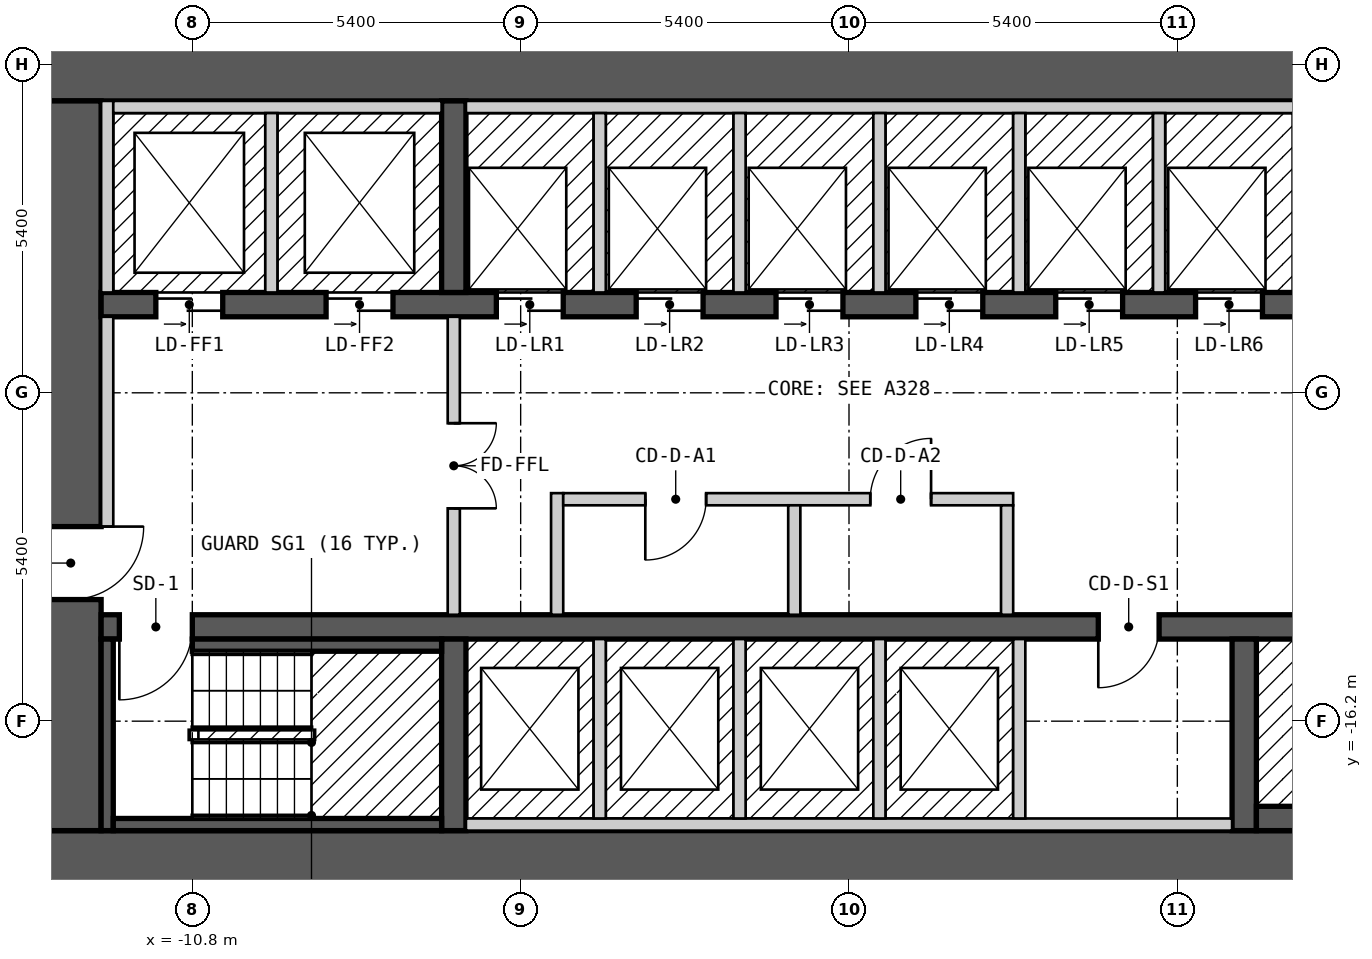
"""IFC4 building model, lengths in metres.
Left out: names, types, materials, properties, quantities, classifications, styles, units other than length and angle.
Written with IfcOpenShell. Run it as: python <this file> out.ifc"""

import sys

from ifc_helpers import new_model, si_unit, direction, frame, frame_2d, origin, place, context, subcontext, project, spatial, rectangle, extrude, element, fill, save


model = new_model("IFC4")
c1 = context("Model", 3, precision=1e-05, world=origin(), true_north=direction((0.0, 1.0)))
c2 = subcontext(c1, "Body", "Model", "MODEL_VIEW")
j1 = project(units=[si_unit("LENGTHUNIT", "METRE"), si_unit("PLANEANGLEUNIT", "RADIAN")], contexts=[c1])
p1 = place(None, origin())
s1 = spatial("IfcSite", under=j1, at=p1, CompositionType="ELEMENT")
p2 = place(p1, origin())
s2 = spatial("IfcBuilding", under=s1, at=p2, CompositionType="ELEMENT")
p3 = place(p2, frame((0.0, 0.0, 99.0)))
s3 = spatial("IfcBuildingStorey", under=s2, at=p3, CompositionType="ELEMENT", Elevation=99.0)
p4 = place(p3, frame((-13.3, -18.5, 0.0), z_axis=(0.0, 0.0, 1.0), x_axis=(1.0, 0.0, 0.0)))
e1 = element("IfcWall", 1, at=p4, inside=s3, PredefinedType="SHEAR", context=c2, shape_type="SweptSolid", body=[
    extrude(rectangle(XDim=26.6, YDim=1.0, at=frame_2d((13.3, 0.0))), origin(), (0.0, 0.0, 1.0), 2.7),
])
p5 = place(p3, frame((-13.3, -5.5, 0.0), z_axis=(0.0, 0.0, 1.0), x_axis=(1.0, 0.0, 0.0)))
e2 = element("IfcWall", 2, at=p5, inside=s3, PredefinedType="SHEAR", context=c2, shape_type="SweptSolid", body=[
    extrude(rectangle(XDim=26.6, YDim=1.0, at=frame_2d((13.3, 0.0))), origin(), (0.0, 0.0, 1.0), 2.7),
])
p6 = place(p5, frame((23.65, 0.0, 0.0)))
e3 = element("IfcOpeningElement", 3, at=p6, cuts=e2, PredefinedType="OPENING", context=c2, shape_type="SweptSolid", body=[
    extrude(rectangle(XDim=1.2, YDim=2.1, at=frame_2d((0.6, 1.05))), frame((0.0, 0.51, 0.0), z_axis=(0.0, -1.0, 0.0), x_axis=(1.0, 0.0, 0.0)), (0.0, 0.0, 1.0), 1.02),
])
p7 = place(p3, frame((-12.8, -18.0, 0.0), z_axis=(0.0, 0.0, 1.0), x_axis=(0.0, 1.0, 0.0)))
e4 = element("IfcWall", 4, at=p7, inside=s3, PredefinedType="SHEAR", context=c2, shape_type="SweptSolid", body=[
    extrude(rectangle(XDim=12.0, YDim=1.0, at=frame_2d((6.0, 0.0))), origin(), (0.0, 0.0, 1.0), 2.7),
])
p8 = place(p7, frame((3.8, 0.0, 0.0)))
e5 = element("IfcOpeningElement", 5, at=p8, cuts=e4, PredefinedType="OPENING", context=c2, shape_type="SweptSolid", body=[
    extrude(rectangle(XDim=1.2, YDim=2.1, at=frame_2d((0.6, 1.05))), frame((0.0, 0.51, 0.0), z_axis=(0.0, -1.0, 0.0), x_axis=(1.0, 0.0, 0.0)), (0.0, 0.0, 1.0), 1.02),
])
p9 = place(p3, frame((-12.3, -14.65, 0.0), z_axis=(0.0, 0.0, 1.0), x_axis=(1.0, 0.0, 0.0)))
e6 = element("IfcWall", 6, at=p9, inside=s3, PredefinedType="SHEAR", context=c2, shape_type="SweptSolid", body=[
    extrude(rectangle(XDim=24.6, YDim=0.4, at=frame_2d((12.3, 0.0))), origin(), (0.0, 0.0, 1.0), 2.7),
])
p10 = place(p9, frame((1.5, 0.0, 0.0), z_axis=(0.0, 0.0, 1.0), x_axis=(-1.0, 0.0, 0.0)))
e7 = element("IfcOpeningElement", 7, at=p10, cuts=e6, PredefinedType="OPENING", context=c2, shape_type="SweptSolid", body=[
    extrude(rectangle(XDim=1.2, YDim=2.1, at=frame_2d((0.6, 1.05))), frame((0.0, 0.21, 0.0), z_axis=(0.0, -1.0, 0.0), x_axis=(1.0, 0.0, 0.0)), (0.0, 0.0, 1.0), 0.42),
])
p11 = place(p9, frame((24.35, 0.0, 0.0), z_axis=(0.0, 0.0, 1.0), x_axis=(-1.0, 0.0, 0.0)))
e8 = element("IfcOpeningElement", 8, at=p11, cuts=e6, PredefinedType="OPENING", context=c2, shape_type="SweptSolid", body=[
    extrude(rectangle(XDim=1.2, YDim=2.1, at=frame_2d((0.6, 1.05))), frame((0.0, 0.21, 0.0), z_axis=(0.0, -1.0, 0.0), x_axis=(1.0, 0.0, 0.0)), (0.0, 0.0, 1.0), 0.42),
])
p12 = place(p9, frame((17.4, 0.0, 0.0), z_axis=(0.0, 0.0, 1.0), x_axis=(-1.0, 0.0, 0.0)))
e9 = element("IfcOpeningElement", 9, at=p12, cuts=e6, PredefinedType="OPENING", context=c2, shape_type="SweptSolid", body=[
    extrude(rectangle(XDim=1.0, YDim=2.1, at=frame_2d((0.5, 1.05))), frame((0.0, 0.21, 0.0), z_axis=(0.0, -1.0, 0.0), x_axis=(1.0, 0.0, 0.0)), (0.0, 0.0, 1.0), 0.42),
])
p13 = place(p3, frame((-12.3, -9.35, 0.0), z_axis=(0.0, 0.0, 1.0), x_axis=(1.0, 0.0, 0.0)))
e10 = element("IfcWall", 10, at=p13, inside=s3, PredefinedType="SHEAR", context=c2, shape_type="SweptSolid", body=[
    extrude(rectangle(XDim=22.5, YDim=0.4, at=frame_2d((11.25, 0.0))), origin(), (0.0, 0.0, 1.0), 2.7),
])
p14 = place(p13, frame((0.9, 0.0, 0.0)))
e11 = element("IfcOpeningElement", 11, at=p14, cuts=e10, PredefinedType="OPENING", context=c2, shape_type="SweptSolid", body=[
    extrude(rectangle(XDim=1.1, YDim=2.1, at=frame_2d((0.55, 1.05))), frame((0.0, 0.21, 0.0), z_axis=(0.0, -1.0, 0.0), x_axis=(1.0, 0.0, 0.0)), (0.0, 0.0, 1.0), 0.42),
])
p15 = place(p13, frame((3.7, 0.0, 0.0)))
e12 = element("IfcOpeningElement", 12, at=p15, cuts=e10, PredefinedType="OPENING", context=c2, shape_type="SweptSolid", body=[
    extrude(rectangle(XDim=1.1, YDim=2.1, at=frame_2d((0.55, 1.05))), frame((0.0, 0.21, 0.0), z_axis=(0.0, -1.0, 0.0), x_axis=(1.0, 0.0, 0.0)), (0.0, 0.0, 1.0), 0.42),
])
p16 = place(p13, frame((6.5, 0.0, 0.0)))
e13 = element("IfcOpeningElement", 13, at=p16, cuts=e10, PredefinedType="OPENING", context=c2, shape_type="SweptSolid", body=[
    extrude(rectangle(XDim=1.1, YDim=2.1, at=frame_2d((0.55, 1.05))), frame((0.0, 0.21, 0.0), z_axis=(0.0, -1.0, 0.0), x_axis=(1.0, 0.0, 0.0)), (0.0, 0.0, 1.0), 0.42),
])
p17 = place(p13, frame((8.8, 0.0, 0.0)))
e14 = element("IfcOpeningElement", 14, at=p17, cuts=e10, PredefinedType="OPENING", context=c2, shape_type="SweptSolid", body=[
    extrude(rectangle(XDim=1.1, YDim=2.1, at=frame_2d((0.55, 1.05))), frame((0.0, 0.21, 0.0), z_axis=(0.0, -1.0, 0.0), x_axis=(1.0, 0.0, 0.0)), (0.0, 0.0, 1.0), 0.42),
])
p18 = place(p13, frame((11.1, 0.0, 0.0)))
e15 = element("IfcOpeningElement", 15, at=p18, cuts=e10, PredefinedType="OPENING", context=c2, shape_type="SweptSolid", body=[
    extrude(rectangle(XDim=1.1, YDim=2.1, at=frame_2d((0.55, 1.05))), frame((0.0, 0.21, 0.0), z_axis=(0.0, -1.0, 0.0), x_axis=(1.0, 0.0, 0.0)), (0.0, 0.0, 1.0), 0.42),
])
p19 = place(p13, frame((13.4, 0.0, 0.0)))
e16 = element("IfcOpeningElement", 16, at=p19, cuts=e10, PredefinedType="OPENING", context=c2, shape_type="SweptSolid", body=[
    extrude(rectangle(XDim=1.1, YDim=2.1, at=frame_2d((0.55, 1.05))), frame((0.0, 0.21, 0.0), z_axis=(0.0, -1.0, 0.0), x_axis=(1.0, 0.0, 0.0)), (0.0, 0.0, 1.0), 0.42),
])
p20 = place(p13, frame((15.7, 0.0, 0.0)))
e17 = element("IfcOpeningElement", 17, at=p20, cuts=e10, PredefinedType="OPENING", context=c2, shape_type="SweptSolid", body=[
    extrude(rectangle(XDim=1.1, YDim=2.1, at=frame_2d((0.55, 1.05))), frame((0.0, 0.21, 0.0), z_axis=(0.0, -1.0, 0.0), x_axis=(1.0, 0.0, 0.0)), (0.0, 0.0, 1.0), 0.42),
])
p21 = place(p13, frame((18.0, 0.0, 0.0)))
e18 = element("IfcOpeningElement", 18, at=p21, cuts=e10, PredefinedType="OPENING", context=c2, shape_type="SweptSolid", body=[
    extrude(rectangle(XDim=1.1, YDim=2.1, at=frame_2d((0.55, 1.05))), frame((0.0, 0.21, 0.0), z_axis=(0.0, -1.0, 0.0), x_axis=(1.0, 0.0, 0.0)), (0.0, 0.0, 1.0), 0.42),
])
p22 = place(p13, frame((20.4, 0.0, 0.0)))
e19 = element("IfcOpeningElement", 19, at=p22, cuts=e10, PredefinedType="OPENING", context=c2, shape_type="SweptSolid", body=[
    extrude(rectangle(XDim=1.1, YDim=2.1, at=frame_2d((0.55, 1.05))), frame((0.0, 0.21, 0.0), z_axis=(0.0, -1.0, 0.0), x_axis=(1.0, 0.0, 0.0)), (0.0, 0.0, 1.0), 0.42),
])
for number, where, z_axis, x_axis in (
    (20, (-6.5, -18.0, 0.0), (0.0, 0.0, 1.0), (0.0, 1.0, 0.0)),
    (21, (6.5, -18.0, 0.0), (0.0, 0.0, 1.0), (0.0, 1.0, 0.0)),
    (22, (-6.5, -9.15, 0.0), (0.0, 0.0, 1.0), (0.0, 1.0, 0.0)),
):
    element("IfcWall", number, at=place(p3, frame(where, z_axis=z_axis, x_axis=x_axis)), inside=s3, PredefinedType="SHEAR", context=c2, shape_type="SweptSolid", body=[
        extrude(rectangle(XDim=3.15, YDim=0.4, at=frame_2d((1.575, 0.0))), origin(), (0.0, 0.0, 1.0), 2.7),
    ])
p23 = place(p3, frame((-12.2, -18.0, 0.0), z_axis=(0.0, 0.0, 1.0), x_axis=(0.0, 1.0, 0.0)))
e23 = element("IfcWall", 23, at=p23, inside=s3, PredefinedType="SOLIDWALL", context=c2, shape_type="SweptSolid", body=[
    extrude(rectangle(XDim=3.15, YDim=0.2, at=frame_2d((1.575, 0.0))), origin(), (0.0, 0.0, 1.0), 2.7),
])
p24 = place(p3, frame((-12.2, -13.0, 0.0), z_axis=(0.0, 0.0, 1.0), x_axis=(0.0, 1.0, 0.0)))
e24 = element("IfcWall", 24, at=p24, inside=s3, PredefinedType="PARTITIONING", context=c2, shape_type="SweptSolid", body=[
    extrude(rectangle(XDim=3.45, YDim=0.2, at=frame_2d((1.725, 0.0))), origin(), (0.0, 0.0, 1.0), 2.7),
])
p25 = place(p3, frame((-12.2, -9.15, 0.0), z_axis=(0.0, 0.0, 1.0), x_axis=(0.0, 1.0, 0.0)))
e25 = element("IfcWall", 25, at=p25, inside=s3, PredefinedType="SOLIDWALL", context=c2, shape_type="SweptSolid", body=[
    extrude(rectangle(XDim=3.15, YDim=0.2, at=frame_2d((1.575, 0.0))), origin(), (0.0, 0.0, 1.0), 2.7),
])
for number, where, z_axis, x_axis in (
    (26, (-12.1, -17.9, 0.0), (0.0, 0.0, 1.0), (1.0, 0.0, 0.0)),
    (27, (-12.1, -6.1, 0.0), (0.0, 0.0, 1.0), (1.0, 0.0, 0.0)),
):
    element("IfcWall", number, at=place(p3, frame(where, z_axis=z_axis, x_axis=x_axis)), inside=s3, PredefinedType="SOLIDWALL", context=c2, shape_type="SweptSolid", body=[
        extrude(rectangle(XDim=5.4, YDim=0.2, at=frame_2d((2.7, 0.0))), origin(), (0.0, 0.0, 1.0), 2.7),
    ])
p26 = place(p3, frame((-10.8, -14.95, 0.0), z_axis=(0.0, 0.0, 1.0), x_axis=(1.0, 0.0, 0.0)))
e28 = element("IfcWall", 28, at=p26, inside=s3, PredefinedType="SOLIDWALL", context=c2, shape_type="SweptSolid", body=[
    extrude(rectangle(XDim=4.1, YDim=0.2, at=frame_2d((2.05, 0.0))), origin(), (0.0, 0.0, 1.0), 2.7),
])
p27 = place(p3, frame((-9.5, -9.15, 0.0), z_axis=(0.0, 0.0, 1.0), x_axis=(0.0, 1.0, 0.0)))
e29 = element("IfcWall", 29, at=p27, inside=s3, PredefinedType="SOLIDWALL", context=c2, shape_type="SweptSolid", body=[
    extrude(rectangle(XDim=2.95, YDim=0.2, at=frame_2d((1.475, 0.0))), origin(), (0.0, 0.0, 1.0), 2.7),
])
p28 = place(p3, frame((-6.5, -14.45, 0.0), z_axis=(0.0, 0.0, 1.0), x_axis=(0.0, 1.0, 0.0)))
e30 = element("IfcWall", 30, at=p28, inside=s3, PredefinedType="PARTITIONING", context=c2, shape_type="SweptSolid", body=[
    extrude(rectangle(XDim=4.9, YDim=0.2, at=frame_2d((2.45, 0.0))), origin(), (0.0, 0.0, 1.0), 2.7),
])
p29 = place(p28, frame((3.15, 0.0, 0.0), z_axis=(0.0, 0.0, 1.0), x_axis=(-1.0, 0.0, 0.0)))
e31 = element("IfcOpeningElement", 31, at=p29, cuts=e30, PredefinedType="OPENING", context=c2, shape_type="SweptSolid", body=[
    extrude(rectangle(XDim=1.4, YDim=2.1, at=frame_2d((0.7, 1.05))), frame((0.0, 0.11, 0.0), z_axis=(0.0, -1.0, 0.0), x_axis=(1.0, 0.0, 0.0)), (0.0, 0.0, 1.0), 0.22),
])
p30 = place(p3, frame((-6.3, -17.9, 0.0), z_axis=(0.0, 0.0, 1.0), x_axis=(1.0, 0.0, 0.0)))
e32 = element("IfcWall", 32, at=p30, inside=s3, PredefinedType="SOLIDWALL", context=c2, shape_type="SweptSolid", body=[
    extrude(rectangle(XDim=12.6, YDim=0.2, at=frame_2d((6.3, 0.0))), origin(), (0.0, 0.0, 1.0), 2.7),
])
p31 = place(p3, frame((-6.3, -6.1, 0.0), z_axis=(0.0, 0.0, 1.0), x_axis=(1.0, 0.0, 0.0)))
e33 = element("IfcWall", 33, at=p31, inside=s3, PredefinedType="SOLIDWALL", context=c2, shape_type="SweptSolid", body=[
    extrude(rectangle(XDim=16.1, YDim=0.2, at=frame_2d((8.05, 0.0))), origin(), (0.0, 0.0, 1.0), 2.7),
])
p32 = place(p3, frame((-4.8, -14.45, 0.0), z_axis=(0.0, 0.0, 1.0), x_axis=(0.0, 1.0, 0.0)))
e34 = element("IfcWall", 34, at=p32, inside=s3, PredefinedType="PARTITIONING", context=c2, shape_type="SweptSolid", body=[
    extrude(rectangle(XDim=2.0, YDim=0.2, at=frame_2d((1.0, 0.0))), origin(), (0.0, 0.0, 1.0), 2.7),
])
p33 = place(p3, frame((-4.7, -12.55, 0.0), z_axis=(0.0, 0.0, 1.0), x_axis=(1.0, 0.0, 0.0)))
e35 = element("IfcWall", 35, at=p33, inside=s3, PredefinedType="PARTITIONING", context=c2, shape_type="SweptSolid", body=[
    extrude(rectangle(XDim=7.4, YDim=0.2, at=frame_2d((3.7, 0.0))), origin(), (0.0, 0.0, 1.0), 2.7),
])
p34 = place(p33, frame((2.35, 0.0, 0.0), z_axis=(0.0, 0.0, 1.0), x_axis=(-1.0, 0.0, 0.0)))
e36 = element("IfcOpeningElement", 36, at=p34, cuts=e35, PredefinedType="OPENING", context=c2, shape_type="SweptSolid", body=[
    extrude(rectangle(XDim=1.0, YDim=2.1, at=frame_2d((0.5, 1.05))), frame((0.0, 0.11, 0.0), z_axis=(0.0, -1.0, 0.0), x_axis=(1.0, 0.0, 0.0)), (0.0, 0.0, 1.0), 0.22),
])
p35 = place(p33, frame((6.05, 0.0, 0.0), z_axis=(0.0, 0.0, 1.0), x_axis=(-1.0, 0.0, 0.0)))
e37 = element("IfcOpeningElement", 37, at=p35, cuts=e35, PredefinedType="OPENING", context=c2, shape_type="SweptSolid", body=[
    extrude(rectangle(XDim=1.0, YDim=2.1, at=frame_2d((0.5, 1.05))), frame((0.0, 0.11, 0.0), z_axis=(0.0, -1.0, 0.0), x_axis=(1.0, 0.0, 0.0)), (0.0, 0.0, 1.0), 0.22),
])
for number, where, z_axis, x_axis in (
    (38, (-4.1, -17.8, 0.0), (0.0, 0.0, 1.0), (0.0, 1.0, 0.0)),
    (39, (-4.1, -9.15, 0.0), (0.0, 0.0, 1.0), (0.0, 1.0, 0.0)),
    (40, (-1.8, -17.8, 0.0), (0.0, 0.0, 1.0), (0.0, 1.0, 0.0)),
    (41, (-1.8, -9.15, 0.0), (0.0, 0.0, 1.0), (0.0, 1.0, 0.0)),
):
    element("IfcWall", number, at=place(p3, frame(where, z_axis=z_axis, x_axis=x_axis)), inside=s3, PredefinedType="SOLIDWALL", context=c2, shape_type="SweptSolid", body=[
        extrude(rectangle(XDim=2.95, YDim=0.2, at=frame_2d((1.475, 0.0))), origin(), (0.0, 0.0, 1.0), 2.7),
    ])
p36 = place(p3, frame((-0.9, -14.45, 0.0), z_axis=(0.0, 0.0, 1.0), x_axis=(0.0, 1.0, 0.0)))
e42 = element("IfcWall", 42, at=p36, inside=s3, PredefinedType="PARTITIONING", context=c2, shape_type="SweptSolid", body=[
    extrude(rectangle(XDim=1.8, YDim=0.2, at=frame_2d((0.9, 0.0))), origin(), (0.0, 0.0, 1.0), 2.7),
])
for number, where, z_axis, x_axis in (
    (43, (0.5, -17.8, 0.0), (0.0, 0.0, 1.0), (0.0, 1.0, 0.0)),
    (44, (0.5, -9.15, 0.0), (0.0, 0.0, 1.0), (0.0, 1.0, 0.0)),
):
    element("IfcWall", number, at=place(p3, frame(where, z_axis=z_axis, x_axis=x_axis)), inside=s3, PredefinedType="SOLIDWALL", context=c2, shape_type="SweptSolid", body=[
        extrude(rectangle(XDim=2.95, YDim=0.2, at=frame_2d((1.475, 0.0))), origin(), (0.0, 0.0, 1.0), 2.7),
    ])
p37 = place(p3, frame((2.6, -14.45, 0.0), z_axis=(0.0, 0.0, 1.0), x_axis=(0.0, 1.0, 0.0)))
e45 = element("IfcWall", 45, at=p37, inside=s3, PredefinedType="PARTITIONING", context=c2, shape_type="SweptSolid", body=[
    extrude(rectangle(XDim=1.8, YDim=0.2, at=frame_2d((0.9, 0.0))), origin(), (0.0, 0.0, 1.0), 2.7),
])
for number, where, z_axis, x_axis in (
    (46, (2.8, -17.8, 0.0), (0.0, 0.0, 1.0), (0.0, 1.0, 0.0)),
    (47, (2.8, -9.15, 0.0), (0.0, 0.0, 1.0), (0.0, 1.0, 0.0)),
    (48, (5.1, -9.15, 0.0), (0.0, 0.0, 1.0), (0.0, 1.0, 0.0)),
):
    element("IfcWall", number, at=place(p3, frame(where, z_axis=z_axis, x_axis=x_axis)), inside=s3, PredefinedType="SOLIDWALL", context=c2, shape_type="SweptSolid", body=[
        extrude(rectangle(XDim=2.95, YDim=0.2, at=frame_2d((1.475, 0.0))), origin(), (0.0, 0.0, 1.0), 2.7),
    ])
p38 = place(p3, frame((6.7, -17.8, 0.0), z_axis=(0.0, 0.0, 1.0), x_axis=(1.0, 0.0, 0.0)))
e49 = element("IfcWall", 49, at=p38, inside=s3, PredefinedType="SOLIDWALL", context=c2, shape_type="SweptSolid", body=[
    extrude(rectangle(XDim=5.6, YDim=0.4, at=frame_2d((2.8, 0.0))), origin(), (0.0, 0.0, 1.0), 2.7),
])
p39 = place(p3, frame((7.4, -9.15, 0.0), z_axis=(0.0, 0.0, 1.0), x_axis=(0.0, 1.0, 0.0)))
e50 = element("IfcWall", 50, at=p39, inside=s3, PredefinedType="SOLIDWALL", context=c2, shape_type="SweptSolid", body=[
    extrude(rectangle(XDim=2.95, YDim=0.2, at=frame_2d((1.475, 0.0))), origin(), (0.0, 0.0, 1.0), 2.7),
])
p40 = place(p14, origin())
e51 = element("IfcDoor", 51, at=p40, inside=s3, OperationType="DOUBLE_DOOR_SLIDING", PredefinedType="DOOR", context=c2, shape_type="SweptSolid", body=[
    extrude(rectangle(XDim=1.1, YDim=2.1, at=frame_2d((0.55, 1.05))), frame((0.0, 0.025, 0.0), z_axis=(0.0, -1.0, 0.0), x_axis=(1.0, 0.0, 0.0)), (0.0, 0.0, 1.0), 0.05),
])
fill(e11, e51)
p41 = place(p15, origin())
e52 = element("IfcDoor", 52, at=p41, inside=s3, OperationType="DOUBLE_DOOR_SLIDING", PredefinedType="DOOR", context=c2, shape_type="SweptSolid", body=[
    extrude(rectangle(XDim=1.1, YDim=2.1, at=frame_2d((0.55, 1.05))), frame((0.0, 0.025, 0.0), z_axis=(0.0, -1.0, 0.0), x_axis=(1.0, 0.0, 0.0)), (0.0, 0.0, 1.0), 0.05),
])
fill(e12, e52)
p42 = place(p16, origin())
e53 = element("IfcDoor", 53, at=p42, inside=s3, OperationType="DOUBLE_DOOR_SLIDING", PredefinedType="DOOR", context=c2, shape_type="SweptSolid", body=[
    extrude(rectangle(XDim=1.1, YDim=2.1, at=frame_2d((0.55, 1.05))), frame((0.0, 0.025, 0.0), z_axis=(0.0, -1.0, 0.0), x_axis=(1.0, 0.0, 0.0)), (0.0, 0.0, 1.0), 0.05),
])
fill(e13, e53)
p43 = place(p17, origin())
e54 = element("IfcDoor", 54, at=p43, inside=s3, OperationType="DOUBLE_DOOR_SLIDING", PredefinedType="DOOR", context=c2, shape_type="SweptSolid", body=[
    extrude(rectangle(XDim=1.1, YDim=2.1, at=frame_2d((0.55, 1.05))), frame((0.0, 0.025, 0.0), z_axis=(0.0, -1.0, 0.0), x_axis=(1.0, 0.0, 0.0)), (0.0, 0.0, 1.0), 0.05),
])
fill(e14, e54)
p44 = place(p18, origin())
e55 = element("IfcDoor", 55, at=p44, inside=s3, OperationType="DOUBLE_DOOR_SLIDING", PredefinedType="DOOR", context=c2, shape_type="SweptSolid", body=[
    extrude(rectangle(XDim=1.1, YDim=2.1, at=frame_2d((0.55, 1.05))), frame((0.0, 0.025, 0.0), z_axis=(0.0, -1.0, 0.0), x_axis=(1.0, 0.0, 0.0)), (0.0, 0.0, 1.0), 0.05),
])
fill(e15, e55)
p45 = place(p19, origin())
e56 = element("IfcDoor", 56, at=p45, inside=s3, OperationType="DOUBLE_DOOR_SLIDING", PredefinedType="DOOR", context=c2, shape_type="SweptSolid", body=[
    extrude(rectangle(XDim=1.1, YDim=2.1, at=frame_2d((0.55, 1.05))), frame((0.0, 0.025, 0.0), z_axis=(0.0, -1.0, 0.0), x_axis=(1.0, 0.0, 0.0)), (0.0, 0.0, 1.0), 0.05),
])
fill(e16, e56)
p46 = place(p20, origin())
e57 = element("IfcDoor", 57, at=p46, inside=s3, OperationType="DOUBLE_DOOR_SLIDING", PredefinedType="DOOR", context=c2, shape_type="SweptSolid", body=[
    extrude(rectangle(XDim=1.1, YDim=2.1, at=frame_2d((0.55, 1.05))), frame((0.0, 0.025, 0.0), z_axis=(0.0, -1.0, 0.0), x_axis=(1.0, 0.0, 0.0)), (0.0, 0.0, 1.0), 0.05),
])
fill(e17, e57)
p47 = place(p21, origin())
e58 = element("IfcDoor", 58, at=p47, inside=s3, OperationType="DOUBLE_DOOR_SLIDING", PredefinedType="DOOR", context=c2, shape_type="SweptSolid", body=[
    extrude(rectangle(XDim=1.1, YDim=2.1, at=frame_2d((0.55, 1.05))), frame((0.0, 0.025, 0.0), z_axis=(0.0, -1.0, 0.0), x_axis=(1.0, 0.0, 0.0)), (0.0, 0.0, 1.0), 0.05),
])
fill(e18, e58)
p48 = place(p10, origin())
e59 = element("IfcDoor", 59, at=p48, inside=s3, OperationType="SINGLE_SWING_RIGHT", PredefinedType="DOOR", context=c2, shape_type="SweptSolid", body=[
    extrude(rectangle(XDim=1.2, YDim=2.1, at=frame_2d((0.6, 1.05))), frame((0.0, 0.025, 0.0), z_axis=(0.0, -1.0, 0.0), x_axis=(1.0, 0.0, 0.0)), (0.0, 0.0, 1.0), 0.05),
])
fill(e7, e59)
p49 = place(p8, origin())
e60 = element("IfcDoor", 60, at=p49, inside=s3, OperationType="SINGLE_SWING_RIGHT", PredefinedType="DOOR", context=c2, shape_type="SweptSolid", body=[
    extrude(rectangle(XDim=1.2, YDim=2.1, at=frame_2d((0.6, 1.05))), frame((0.0, 0.025, 0.0), z_axis=(0.0, -1.0, 0.0), x_axis=(1.0, 0.0, 0.0)), (0.0, 0.0, 1.0), 0.05),
])
fill(e5, e60)
p50 = place(p29, origin())
e61 = element("IfcDoor", 61, at=p50, inside=s3, OperationType="DOUBLE_DOOR_SINGLE_SWING", PredefinedType="DOOR", context=c2, shape_type="SweptSolid", body=[
    extrude(rectangle(XDim=1.4, YDim=2.1, at=frame_2d((0.7, 1.05))), frame((0.0, 0.025, 0.0), z_axis=(0.0, -1.0, 0.0), x_axis=(1.0, 0.0, 0.0)), (0.0, 0.0, 1.0), 0.05),
])
fill(e31, e61)
p51 = place(p34, origin())
e62 = element("IfcDoor", 62, at=p51, inside=s3, OperationType="SINGLE_SWING_RIGHT", PredefinedType="DOOR", context=c2, shape_type="SweptSolid", body=[
    extrude(rectangle(XDim=1.0, YDim=2.1, at=frame_2d((0.5, 1.05))), frame((0.0, 0.025, 0.0), z_axis=(0.0, -1.0, 0.0), x_axis=(1.0, 0.0, 0.0)), (0.0, 0.0, 1.0), 0.05),
])
fill(e36, e62)
p52 = place(p35, origin())
e63 = element("IfcDoor", 63, at=p52, inside=s3, OperationType="SINGLE_SWING_LEFT", PredefinedType="DOOR", context=c2, shape_type="SweptSolid", body=[
    extrude(rectangle(XDim=1.0, YDim=2.1, at=frame_2d((0.5, 1.05))), frame((0.0, 0.025, 0.0), z_axis=(0.0, -1.0, 0.0), x_axis=(1.0, 0.0, 0.0)), (0.0, 0.0, 1.0), 0.05),
])
fill(e37, e63)
p53 = place(p12, origin())
e64 = element("IfcDoor", 64, at=p53, inside=s3, OperationType="SINGLE_SWING_RIGHT", PredefinedType="DOOR", context=c2, shape_type="SweptSolid", body=[
    extrude(rectangle(XDim=1.0, YDim=2.1, at=frame_2d((0.5, 1.05))), frame((0.0, 0.025, 0.0), z_axis=(0.0, -1.0, 0.0), x_axis=(1.0, 0.0, 0.0)), (0.0, 0.0, 1.0), 0.05),
])
fill(e9, e64)
save(model, sys.argv[1])
